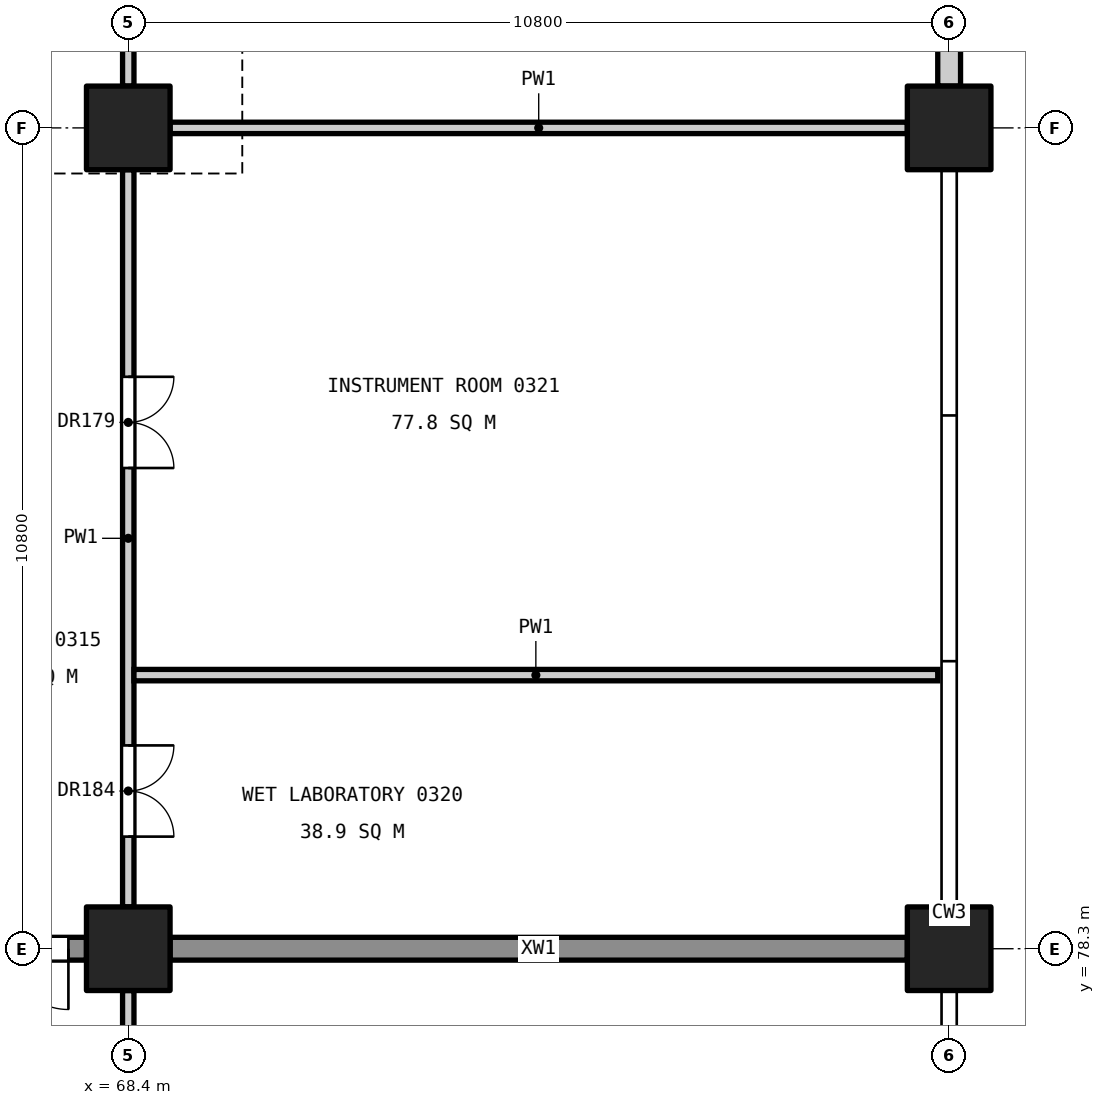
"""IFC4 building model, lengths in metres.
Left out: names, types, materials, properties, quantities, classifications, styles, units other than length and angle.
Written with IfcOpenShell. Run it as: python <this file> out.ifc"""

import sys

from ifc_helpers import new_model, si_unit, direction, frame, frame_2d, origin, origin_2d, place, context, subcontext, project, spatial, rectangle, extrude, element, fill, save


model = new_model("IFC4")
c1 = context("Model", 3, precision=1e-05, world=origin(), true_north=direction((0.0, 1.0)))
c2 = subcontext(c1, "Body", "Model", "MODEL_VIEW")
j1 = project(units=[si_unit("LENGTHUNIT", "METRE"), si_unit("PLANEANGLEUNIT", "RADIAN")], contexts=[c1])
p1 = place(None, origin())
s1 = spatial("IfcSite", under=j1, at=p1, CompositionType="ELEMENT")
p2 = place(p1, origin())
s2 = spatial("IfcBuilding", under=s1, at=p2, CompositionType="ELEMENT")
p3 = place(p2, frame((0.0, 0.0, 16.8)))
s3 = spatial("IfcBuildingStorey", under=s2, at=p3, CompositionType="ELEMENT", Elevation=16.8)
for number, where, z_axis, x_axis in (
    (1, (68.4, 78.3, 0.0), (0.0, 0.0, 1.0), (1.0, 0.0, 0.0)),
    (2, (68.4, 89.1, 0.0), (0.0, 0.0, 1.0), (1.0, 0.0, 0.0)),
    (3, (79.2, 78.3, 0.0), (0.0, 0.0, 1.0), (1.0, 0.0, 0.0)),
    (4, (79.2, 89.1, 0.0), (0.0, 0.0, 1.0), (1.0, 0.0, 0.0)),
):
    element("IfcColumn", number, at=place(p3, frame(where, z_axis=z_axis, x_axis=x_axis)), inside=s3, PredefinedType="COLUMN", context=c2, shape_type="SweptSolid", body=[
        extrude(rectangle(XDim=1.1, YDim=1.1, at=origin_2d()), origin(), (0.0, 0.0, 1.0), 5.4),
    ])
p4 = place(p3, frame((61.75, 78.3, 0.0), z_axis=(0.0, 0.0, 1.0), x_axis=(1.0, 0.0, 0.0)))
e5 = element("IfcWall", 5, at=p4, inside=s3, PredefinedType="SHEAR", context=c2, shape_type="SweptSolid", body=[
    extrude(rectangle(XDim=6.1, YDim=0.3, at=frame_2d((3.05, 0.0))), origin(), (0.0, 0.0, 1.0), 5.15),
])
p5 = place(p4, frame((4.262, 0.0, 0.0)))
e6 = element("IfcOpeningElement", 6, at=p5, cuts=e5, PredefinedType="OPENING", context=c2, shape_type="SweptSolid", body=[
    extrude(rectangle(XDim=1.6, YDim=2.1, at=frame_2d((0.8, 1.05))), frame((0.0, 0.16, 0.0), z_axis=(0.0, -1.0, 0.0), x_axis=(1.0, 0.0, 0.0)), (0.0, 0.0, 1.0), 0.32),
])
p6 = place(p3, frame((68.95, 78.3, 0.0), z_axis=(0.0, 0.0, 1.0), x_axis=(1.0, 0.0, 0.0)))
e7 = element("IfcWall", 7, at=p6, inside=s3, PredefinedType="SHEAR", context=c2, shape_type="SweptSolid", body=[
    extrude(rectangle(XDim=9.7, YDim=0.3, at=frame_2d((4.85, 0.0))), origin(), (0.0, 0.0, 1.0), 5.15),
])
p7 = place(p3, frame((79.2, 89.65, 0.0), z_axis=(0.0, 0.0, 1.0), x_axis=(0.0, 1.0, 0.0)))
e8 = element("IfcWall", 8, at=p7, inside=s3, PredefinedType="STANDARD", context=c2, shape_type="SweptSolid", body=[
    extrude(rectangle(XDim=9.7, YDim=0.3, at=frame_2d((4.85, 0.0))), origin(), (0.0, 0.0, 1.0), 4.15),
])
p8 = place(p3, frame((68.4, 70.8, 0.0), z_axis=(0.0, 0.0, 1.0), x_axis=(0.0, 1.0, 0.0)))
e9 = element("IfcWall", 9, at=p8, inside=s3, PredefinedType="PARTITIONING", context=c2, shape_type="SweptSolid", body=[
    extrude(rectangle(XDim=6.95, YDim=0.15, at=frame_2d((3.475, 0.0))), origin(), (0.0, 0.0, 1.0), 4.15),
])
p9 = place(p8, frame((2.875, 0.0, 0.0)))
e10 = element("IfcOpeningElement", 10, at=p9, cuts=e9, PredefinedType="OPENING", context=c2, shape_type="SweptSolid", body=[
    extrude(rectangle(XDim=1.2, YDim=2.1, at=frame_2d((0.6, 1.05))), frame((0.0, 0.085, 0.0), z_axis=(0.0, -1.0, 0.0), x_axis=(1.0, 0.0, 0.0)), (0.0, 0.0, 1.0), 0.17),
])
p10 = place(p3, frame((68.4, 78.85, 0.0), z_axis=(0.0, 0.0, 1.0), x_axis=(0.0, 1.0, 0.0)))
e11 = element("IfcWall", 11, at=p10, inside=s3, PredefinedType="PARTITIONING", context=c2, shape_type="SweptSolid", body=[
    extrude(rectangle(XDim=9.7, YDim=0.15, at=frame_2d((4.85, 0.0))), origin(), (0.0, 0.0, 1.0), 4.15),
])
p11 = place(p10, frame((5.775, 0.0, 0.0)))
e12 = element("IfcOpeningElement", 12, at=p11, cuts=e11, PredefinedType="OPENING", context=c2, shape_type="SweptSolid", body=[
    extrude(rectangle(XDim=1.2, YDim=2.1, at=frame_2d((0.6, 1.05))), frame((0.0, 0.085, 0.0), z_axis=(0.0, -1.0, 0.0), x_axis=(1.0, 0.0, 0.0)), (0.0, 0.0, 1.0), 0.17),
])
p12 = place(p10, frame((0.925, 0.0, 0.0)))
e13 = element("IfcOpeningElement", 13, at=p12, cuts=e11, PredefinedType="OPENING", context=c2, shape_type="SweptSolid", body=[
    extrude(rectangle(XDim=1.2, YDim=2.1, at=frame_2d((0.6, 1.05))), frame((0.0, 0.085, 0.0), z_axis=(0.0, -1.0, 0.0), x_axis=(1.0, 0.0, 0.0)), (0.0, 0.0, 1.0), 0.17),
])
p13 = place(p3, frame((68.4, 89.65, 0.0), z_axis=(0.0, 0.0, 1.0), x_axis=(0.0, 1.0, 0.0)))
e14 = element("IfcWall", 14, at=p13, inside=s3, PredefinedType="PARTITIONING", context=c2, shape_type="SweptSolid", body=[
    extrude(rectangle(XDim=3.45, YDim=0.15, at=frame_2d((1.725, 0.0))), origin(), (0.0, 0.0, 1.0), 4.15),
])
p14 = place(p13, frame((1.125, 0.0, 0.0)))
e15 = element("IfcOpeningElement", 15, at=p14, cuts=e14, PredefinedType="OPENING", context=c2, shape_type="SweptSolid", body=[
    extrude(rectangle(XDim=1.2, YDim=2.1, at=frame_2d((0.6, 1.05))), frame((0.0, 0.085, 0.0), z_axis=(0.0, -1.0, 0.0), x_axis=(1.0, 0.0, 0.0)), (0.0, 0.0, 1.0), 0.17),
])
p15 = place(p3, frame((68.475, 81.9, 0.0), z_axis=(0.0, 0.0, 1.0), x_axis=(1.0, 0.0, 0.0)))
e16 = element("IfcWall", 16, at=p15, inside=s3, PredefinedType="PARTITIONING", context=c2, shape_type="SweptSolid", body=[
    extrude(rectangle(XDim=10.575, YDim=0.15, at=frame_2d((5.288, 0.0))), origin(), (0.0, 0.0, 1.0), 4.05),
])
p16 = place(p3, frame((68.95, 89.1, 0.0), z_axis=(0.0, 0.0, 1.0), x_axis=(1.0, 0.0, 0.0)))
e17 = element("IfcWall", 17, at=p16, inside=s3, PredefinedType="PARTITIONING", context=c2, shape_type="SweptSolid", body=[
    extrude(rectangle(XDim=9.7, YDim=0.15, at=frame_2d((4.85, 0.0))), origin(), (0.0, 0.0, 1.0), 4.05),
])
p17 = place(p11, frame((1.2, 0.0, 0.0), z_axis=(0.0, 0.0, 1.0), x_axis=(-1.0, 0.0, 0.0)))
e18 = element("IfcDoor", 18, at=p17, inside=s3, OperationType="DOUBLE_DOOR_SINGLE_SWING", PredefinedType="DOOR", context=c2, shape_type="SweptSolid", body=[
    extrude(rectangle(XDim=1.2, YDim=2.1, at=frame_2d((0.6, 1.05))), frame((0.0, 0.025, 0.0), z_axis=(0.0, -1.0, 0.0), x_axis=(1.0, 0.0, 0.0)), (0.0, 0.0, 1.0), 0.05),
])
fill(e12, e18)
p18 = place(p12, frame((1.2, 0.0, 0.0), z_axis=(0.0, 0.0, 1.0), x_axis=(-1.0, 0.0, 0.0)))
e19 = element("IfcDoor", 19, at=p18, inside=s3, OperationType="DOUBLE_DOOR_SINGLE_SWING", PredefinedType="DOOR", context=c2, shape_type="SweptSolid", body=[
    extrude(rectangle(XDim=1.2, YDim=2.1, at=frame_2d((0.6, 1.05))), frame((0.0, 0.025, 0.0), z_axis=(0.0, -1.0, 0.0), x_axis=(1.0, 0.0, 0.0)), (0.0, 0.0, 1.0), 0.05),
])
fill(e13, e19)
p19 = place(p5, frame((1.6, 0.0, 0.0), z_axis=(0.0, 0.0, 1.0), x_axis=(-1.0, 0.0, 0.0)))
e20 = element("IfcDoor", 20, at=p19, inside=s3, OperationType="DOUBLE_DOOR_SINGLE_SWING", PredefinedType="DOOR", context=c2, shape_type="SweptSolid", body=[
    extrude(rectangle(XDim=1.6, YDim=2.1, at=frame_2d((0.8, 1.05))), frame((0.0, 0.025, 0.0), z_axis=(0.0, -1.0, 0.0), x_axis=(1.0, 0.0, 0.0)), (0.0, 0.0, 1.0), 0.05),
])
fill(e6, e20)
save(model, sys.argv[1])
